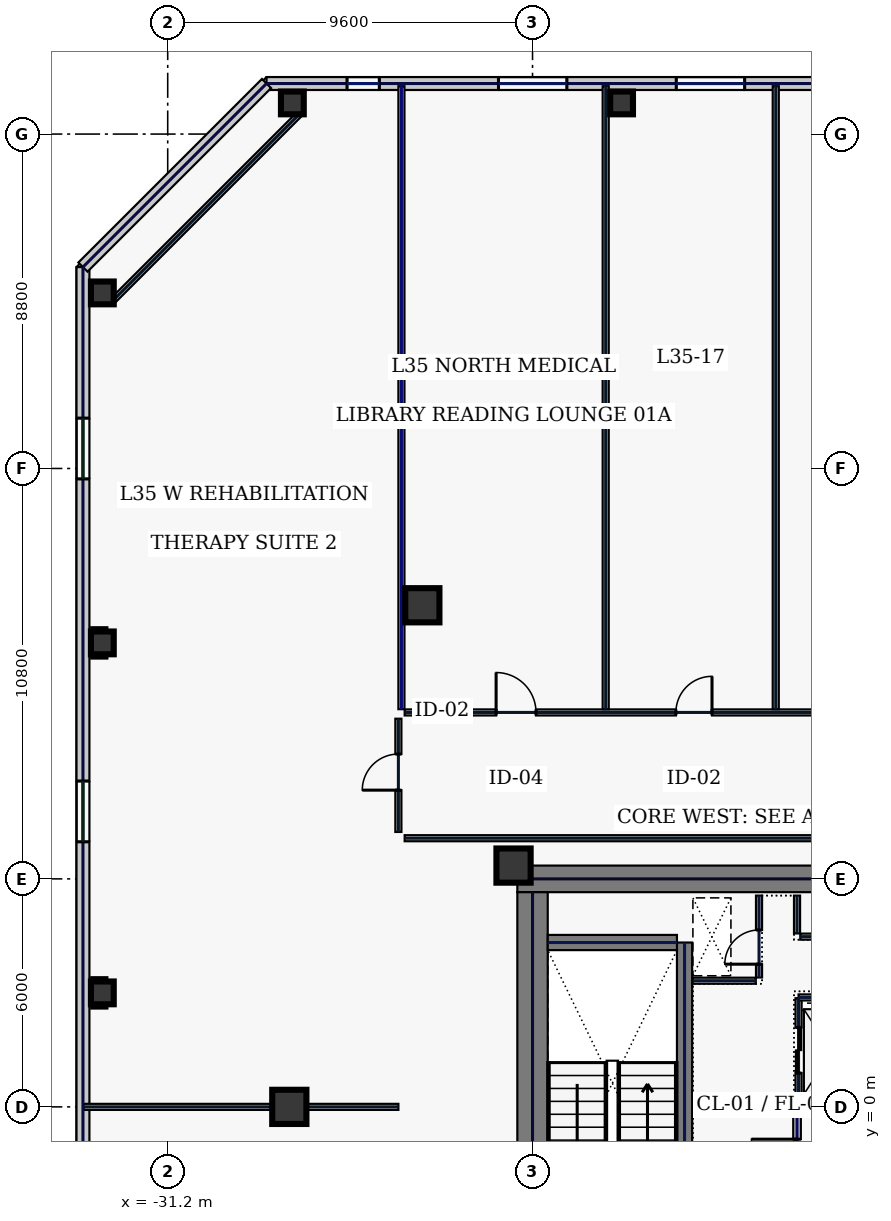
"""IFC4 building model, lengths in metres.
Left out: names, types, materials, properties, quantities, classifications, styles, units other than length and angle.
Written with IfcOpenShell. Run it as: python <this file> out.ifc"""

import sys

from ifc_helpers import new_model, si_unit, direction, frame, frame_2d, origin, origin_2d, place, context, subcontext, project, spatial, rectangle, hollow_rectangle, extrude, element, fill, save


model = new_model("IFC4")
c1 = context("Model", 3, precision=1e-05, world=origin(), true_north=direction((0.0, 1.0)))
c2 = subcontext(c1, "Body", "Model", "MODEL_VIEW")
j1 = project(units=[si_unit("LENGTHUNIT", "METRE"), si_unit("PLANEANGLEUNIT", "RADIAN")], contexts=[c1])
p1 = place(None, origin())
s1 = spatial("IfcSite", under=j1, at=p1, CompositionType="ELEMENT")
p2 = place(p1, origin())
s2 = spatial("IfcBuilding", under=s1, at=p2, CompositionType="ELEMENT")
p3 = place(p2, frame((0.0, 0.0, 156.2)))
s3 = spatial("IfcBuildingStorey", under=s2, at=p3, CompositionType="ELEMENT", Elevation=156.2)
p4 = place(p3, frame((-22.0, 6.0, 0.0), z_axis=(0.0, 0.0, 1.0), x_axis=(1.0, 0.0, 0.0)))
e1 = element("IfcWall", 1, at=p4, inside=s3, PredefinedType="SHEAR", context=c2, shape_type="SweptSolid", body=[
    extrude(rectangle(XDim=11.55, YDim=0.7, at=frame_2d((5.775, 0.0))), origin(), (0.0, 0.0, 1.0), 3.74),
])
p5 = place(p3, frame((-21.6, -5.65, 0.0), z_axis=(0.0, 0.0, 1.0), x_axis=(0.0, 1.0, 0.0)))
e2 = element("IfcWall", 2, at=p5, inside=s3, PredefinedType="SHEAR", context=c2, shape_type="SweptSolid", body=[
    extrude(rectangle(XDim=11.3, YDim=0.8, at=frame_2d((5.65, 0.0))), origin(), (0.0, 0.0, 1.0), 3.74),
])
p6 = place(p3, frame((-17.6, -4.325, 0.0), z_axis=(0.0, 0.0, 1.0), x_axis=(0.0, 1.0, 0.0)))
e3 = element("IfcWall", 3, at=p6, inside=s3, PredefinedType="SHEAR", context=c2, shape_type="SweptSolid", body=[
    extrude(rectangle(XDim=8.65, YDim=0.4, at=frame_2d((4.325, 0.0))), origin(), (0.0, 0.0, 1.0), 3.74),
])
p7 = place(p6, frame((0.25, 0.0, 0.0)))
e4 = element("IfcOpeningElement", 4, at=p7, cuts=e3, PredefinedType="OPENING", context=c2, shape_type="SweptSolid", body=[
    extrude(rectangle(XDim=1.1, YDim=2.2, at=frame_2d((0.55, 1.1))), frame((0.0, 0.21, 0.0), z_axis=(0.0, -1.0, 0.0), x_axis=(1.0, 0.0, 0.0)), (0.0, 0.0, 1.0), 0.42),
])
p8 = place(p3, frame((-21.2, 4.325, 0.0), z_axis=(0.0, 0.0, 1.0), x_axis=(1.0, 0.0, 0.0)))
e5 = element("IfcWall", 5, at=p8, inside=s3, PredefinedType="SHEAR", context=c2, shape_type="SweptSolid", body=[
    extrude(rectangle(XDim=3.4, YDim=0.4, at=frame_2d((1.7, 0.0))), origin(), (0.0, 0.0, 1.0), 3.74),
])
for number, where, z_axis, x_axis in (
    (6, (-22.1, 6.35, 0.0), (0.0, 0.0, 1.0), (1.0, 0.0, 0.0)),
    (7, (-24.5, 13.2, 0.0), (0.0, 0.0, 1.0), (1.0, 0.0, 0.0)),
    (8, (-28.0, 0.0, 0.0), (0.0, 0.0, 1.0), (1.0, 0.0, 0.0)),
):
    element("IfcColumn", number, at=place(p3, frame(where, z_axis=z_axis, x_axis=x_axis)), inside=s3, PredefinedType="COLUMN", context=c2, shape_type="SweptSolid", body=[
        extrude(hollow_rectangle(XDim=0.9, YDim=0.9, WallThickness=0.04, at=origin_2d()), origin(), (0.0, 0.0, 1.0), 3.74),
    ])
for number, where, z_axis, x_axis in (
    (9, (-19.257, 26.42, 0.0), (0.0, 0.0, 1.0), (1.0, 0.0, 0.0)),
    (10, (-27.92, 26.42, 0.0), (0.0, 0.0, 1.0), (1.0, 0.0, 0.0)),
    (11, (-32.92, 21.42, 0.0), (0.0, 0.0, 1.0), (1.0, 0.0, 0.0)),
    (12, (-32.92, 12.21, 0.0), (0.0, 0.0, 1.0), (1.0, 0.0, 0.0)),
    (13, (-32.92, 3.0, 0.0), (0.0, 0.0, 1.0), (1.0, 0.0, 0.0)),
):
    element("IfcColumn", number, at=place(p3, frame(where, z_axis=z_axis, x_axis=x_axis)), inside=s3, PredefinedType="COLUMN", context=c2, shape_type="SweptSolid", body=[
        extrude(hollow_rectangle(XDim=0.6, YDim=0.6, WallThickness=0.028, at=origin_2d()), origin(), (0.0, 0.0, 1.0), 3.74),
    ])
p9 = place(p3, frame((-8.663, 26.93, 0.0), z_axis=(0.0, 0.0, 1.0), x_axis=(-1.0, 0.0, 0.0)))
e14 = element("IfcWall", 14, at=p9, inside=s3, PredefinedType="STANDARD", context=c2, shape_type="SweptSolid", body=[
    extrude(rectangle(XDim=19.937, YDim=0.34, at=frame_2d((9.969, 0.0))), origin(), (0.0, 0.0, 1.0), 3.74),
])
p10 = place(p9, frame((16.968, 0.0, 0.7)))
e15 = element("IfcOpeningElement", 15, at=p10, cuts=e14, PredefinedType="OPENING", context=c2, shape_type="SweptSolid", body=[
    extrude(rectangle(XDim=0.85, YDim=1.85, at=frame_2d((0.425, 0.925))), frame((0.0, 0.18, 0.0), z_axis=(0.0, -1.0, 0.0), x_axis=(1.0, 0.0, 0.0)), (0.0, 0.0, 1.0), 0.36),
])
p11 = place(p9, frame((12.033, 0.0, 0.7)))
e16 = element("IfcOpeningElement", 16, at=p11, cuts=e14, PredefinedType="OPENING", context=c2, shape_type="SweptSolid", body=[
    extrude(rectangle(XDim=1.8, YDim=2.2, at=frame_2d((0.9, 1.1))), frame((0.0, 0.18, 0.0), z_axis=(0.0, -1.0, 0.0), x_axis=(1.0, 0.0, 0.0)), (0.0, 0.0, 1.0), 0.36),
])
p12 = place(p9, frame((7.355, 0.0, 0.7)))
e17 = element("IfcOpeningElement", 17, at=p12, cuts=e14, PredefinedType="OPENING", context=c2, shape_type="SweptSolid", body=[
    extrude(rectangle(XDim=1.8, YDim=2.2, at=frame_2d((0.9, 1.1))), frame((0.0, 0.18, 0.0), z_axis=(0.0, -1.0, 0.0), x_axis=(1.0, 0.0, 0.0)), (0.0, 0.0, 1.0), 0.36),
])
p13 = place(p9, frame((3.371, 0.0, 0.7)))
e18 = element("IfcOpeningElement", 18, at=p13, cuts=e14, PredefinedType="OPENING", context=c2, shape_type="SweptSolid", body=[
    extrude(rectangle(XDim=1.8, YDim=2.2, at=frame_2d((0.9, 1.1))), frame((0.0, 0.18, 0.0), z_axis=(0.0, -1.0, 0.0), x_axis=(1.0, 0.0, 0.0)), (0.0, 0.0, 1.0), 0.36),
])
p14 = place(p3, frame((-33.43, 22.1, 0.0), z_axis=(0.0, 0.0, 1.0), x_axis=(0.0, -1.0, 0.0)))
e19 = element("IfcWall", 19, at=p14, inside=s3, PredefinedType="STANDARD", context=c2, shape_type="SweptSolid", body=[
    extrude(rectangle(XDim=38.2, YDim=0.34, at=frame_2d((19.1, 0.0))), origin(), (0.0, 0.0, 1.0), 3.74),
])
p15 = place(p14, frame((3.975, 0.0, 0.58)))
e20 = element("IfcOpeningElement", 20, at=p15, cuts=e19, PredefinedType="OPENING", context=c2, shape_type="SweptSolid", body=[
    extrude(rectangle(XDim=1.6, YDim=2.3, at=frame_2d((0.8, 1.15))), frame((0.0, 0.18, 0.0), z_axis=(0.0, -1.0, 0.0), x_axis=(1.0, 0.0, 0.0)), (0.0, 0.0, 1.0), 0.36),
])
p16 = place(p14, frame((13.525, 0.0, 0.58)))
e21 = element("IfcOpeningElement", 21, at=p16, cuts=e19, PredefinedType="OPENING", context=c2, shape_type="SweptSolid", body=[
    extrude(rectangle(XDim=1.6, YDim=2.3, at=frame_2d((0.8, 1.15))), frame((0.0, 0.18, 0.0), z_axis=(0.0, -1.0, 0.0), x_axis=(1.0, 0.0, 0.0)), (0.0, 0.0, 1.0), 0.36),
])
p17 = place(p14, frame((23.075, 0.0, 0.58)))
e22 = element("IfcOpeningElement", 22, at=p17, cuts=e19, PredefinedType="OPENING", context=c2, shape_type="SweptSolid", body=[
    extrude(rectangle(XDim=1.6, YDim=2.3, at=frame_2d((0.8, 1.15))), frame((0.0, 0.18, 0.0), z_axis=(0.0, -1.0, 0.0), x_axis=(1.0, 0.0, 0.0)), (0.0, 0.0, 1.0), 0.36),
])
p18 = place(p14, frame((32.625, 0.0, 0.58)))
e23 = element("IfcOpeningElement", 23, at=p18, cuts=e19, PredefinedType="OPENING", context=c2, shape_type="SweptSolid", body=[
    extrude(rectangle(XDim=1.6, YDim=2.3, at=frame_2d((0.8, 1.15))), frame((0.0, 0.18, 0.0), z_axis=(0.0, -1.0, 0.0), x_axis=(1.0, 0.0, 0.0)), (0.0, 0.0, 1.0), 0.36),
])
p19 = place(p3, frame((-28.6, 26.93, 0.0), z_axis=(0.0, 0.0, 1.0), x_axis=(-0.707106781187, -0.707106781187, 0.0)))
e24 = element("IfcWall", 24, at=p19, inside=s3, PredefinedType="STANDARD", context=c2, shape_type="SweptSolid", body=[
    extrude(rectangle(XDim=6.83, YDim=0.34, at=frame_2d((3.415, 0.0))), origin(), (0.0, 0.0, 1.0), 3.74),
])
p20 = place(p3, frame((-14.6, 0.12, 0.0), z_axis=(0.0, 0.0, 1.0), x_axis=(0.0, 1.0, 0.0)))
e25 = element("IfcWall", 25, at=p20, inside=s3, PredefinedType="PARTITIONING", context=c2, shape_type="SweptSolid", body=[
    extrude(rectangle(XDim=2.74, YDim=0.16, at=frame_2d((1.37, 0.0))), origin(), (0.0, 0.0, 1.0), 3.74),
])
p21 = place(p20, frame((0.77, 0.0, 0.0)))
e26 = element("IfcOpeningElement", 26, at=p21, cuts=e25, PredefinedType="OPENING", context=c2, shape_type="SweptSolid", body=[
    extrude(rectangle(XDim=1.2, YDim=2.2, at=frame_2d((0.6, 1.1))), frame((0.0, 0.09, 0.0), z_axis=(0.0, -1.0, 0.0), x_axis=(1.0, 0.0, 0.0)), (0.0, 0.0, 1.0), 0.18),
])
for number, where, z_axis, x_axis in (
    (27, (-14.6, 0.1, 0.0), (0.0, 0.0, 1.0), (1.0, 0.0, 0.0)),
    (28, (-14.6, 2.88, 0.0), (0.0, 0.0, 1.0), (1.0, 0.0, 0.0)),
):
    element("IfcWall", number, at=place(p3, frame(where, z_axis=z_axis, x_axis=x_axis)), inside=s3, PredefinedType="PARTITIONING", context=c2, shape_type="SweptSolid", body=[
        extrude(rectangle(XDim=1.76, YDim=0.16, at=frame_2d((0.88, 0.0))), origin(), (0.0, 0.0, 1.0), 3.74),
    ])
p22 = place(p3, frame((-15.64, 3.405, 0.0), z_axis=(0.0, 0.0, 1.0), x_axis=(0.0, 1.0, 0.0)))
e29 = element("IfcWall", 29, at=p22, inside=s3, PredefinedType="PARTITIONING", context=c2, shape_type="SweptSolid", body=[
    extrude(rectangle(XDim=2.155, YDim=0.16, at=frame_2d((1.078, 0.0))), origin(), (0.0, 0.0, 1.0), 3.74),
])
p23 = place(p22, frame((0.35, 0.0, 0.0)))
e30 = element("IfcOpeningElement", 30, at=p23, cuts=e29, PredefinedType="OPENING", context=c2, shape_type="SweptSolid", body=[
    extrude(rectangle(XDim=0.9, YDim=2.2, at=frame_2d((0.45, 1.1))), frame((0.0, 0.09, 0.0), z_axis=(0.0, -1.0, 0.0), x_axis=(1.0, 0.0, 0.0)), (0.0, 0.0, 1.0), 0.18),
])
p24 = place(p3, frame((-17.38, 3.32, 0.0), z_axis=(0.0, 0.0, 1.0), x_axis=(1.0, 0.0, 0.0)))
e31 = element("IfcWall", 31, at=p24, inside=s3, PredefinedType="PARTITIONING", context=c2, shape_type="SweptSolid", body=[
    extrude(rectangle(XDim=1.655, YDim=0.16, at=frame_2d((0.827, 0.0))), origin(), (0.0, 0.0, 1.0), 3.74),
])
p25 = place(p3, frame((-14.555, 4.48, 0.0), z_axis=(0.0, 0.0, 1.0), x_axis=(1.0, 0.0, 0.0)))
e32 = element("IfcWall", 32, at=p25, inside=s3, PredefinedType="PARTITIONING", context=c2, shape_type="SweptSolid", body=[
    extrude(rectangle(XDim=1.89, YDim=0.16, at=frame_2d((0.945, 0.0))), origin(), (0.0, 0.0, 1.0), 3.74),
])
p26 = place(p25, frame((0.5, 0.0, 0.0)))
e33 = element("IfcOpeningElement", 33, at=p26, cuts=e32, PredefinedType="OPENING", context=c2, shape_type="SweptSolid", body=[
    extrude(rectangle(XDim=0.95, YDim=2.2, at=frame_2d((0.475, 1.1))), frame((0.0, 0.09, 0.0), z_axis=(0.0, -1.0, 0.0), x_axis=(1.0, 0.0, 0.0)), (0.0, 0.0, 1.0), 0.18),
])
p27 = place(p3, frame((-14.64, 4.565, 0.0), z_axis=(0.0, 0.0, 1.0), x_axis=(0.0, 1.0, 0.0)))
e34 = element("IfcWall", 34, at=p27, inside=s3, PredefinedType="PARTITIONING", context=c2, shape_type="SweptSolid", body=[
    extrude(rectangle(XDim=0.995, YDim=0.16, at=frame_2d((0.498, 0.0))), origin(), (0.0, 0.0, 1.0), 3.74),
])
p28 = place(p3, frame((-14.64, -5.56, 0.0), z_axis=(0.0, 0.0, 1.0), x_axis=(0.0, 1.0, 0.0)))
e35 = element("IfcWall", 35, at=p28, inside=s3, PredefinedType="SOLIDWALL", context=c2, shape_type="SweptSolid", body=[
    extrude(rectangle(XDim=5.6, YDim=0.2, at=frame_2d((2.8, 0.0))), origin(), (0.0, 0.0, 1.0), 3.74),
])
p29 = place(p28, frame((3.51, 0.0, 0.0)))
e36 = element("IfcOpeningElement", 36, at=p29, cuts=e35, PredefinedType="OPENING", context=c2, shape_type="SweptSolid", body=[
    extrude(rectangle(XDim=1.2, YDim=2.2, at=frame_2d((0.6, 1.1))), frame((0.0, 0.11, 0.0), z_axis=(0.0, -1.0, 0.0), x_axis=(1.0, 0.0, 0.0)), (0.0, 0.0, 1.0), 0.22),
])
p30 = place(p3, frame((-27.68, 26.18, 0.0), z_axis=(0.0, 0.0, 1.0), x_axis=(-0.707106781187, -0.707106781187, 0.0)))
e37 = element("IfcWall", 37, at=p30, inside=s3, PredefinedType="PARTITIONING", context=c2, shape_type="SweptSolid", body=[
    extrude(rectangle(XDim=7.071, YDim=0.16, at=frame_2d((3.536, 0.0))), origin(), (0.0, 0.0, 1.0), 3.74),
])
p31 = place(p3, frame((-10.715, 7.07, 0.0), z_axis=(0.0, 0.0, 1.0), x_axis=(-1.0, 0.0, 0.0)))
e38 = element("IfcWall", 38, at=p31, inside=s3, PredefinedType="PARTITIONING", context=c2, shape_type="SweptSolid", body=[
    extrude(rectangle(XDim=14.25, YDim=0.16, at=frame_2d((7.125, 0.0))), origin(), (0.0, 0.0, 1.0), 3.74),
])
p32 = place(p3, frame((-25.13, 7.235, 0.0), z_axis=(0.0, 0.0, 1.0), x_axis=(0.0, 1.0, 0.0)))
e39 = element("IfcWall", 39, at=p32, inside=s3, PredefinedType="PARTITIONING", context=c2, shape_type="SweptSolid", body=[
    extrude(rectangle(XDim=2.98, YDim=0.16, at=frame_2d((1.49, 0.0))), origin(), (0.0, 0.0, 1.0), 3.74),
])
p33 = place(p32, frame((1.1, 0.0, 0.0)))
e40 = element("IfcOpeningElement", 40, at=p33, cuts=e39, PredefinedType="OPENING", context=c2, shape_type="SweptSolid", body=[
    extrude(rectangle(XDim=0.95, YDim=2.2, at=frame_2d((0.475, 1.1))), frame((0.0, 0.09, 0.0), z_axis=(0.0, -1.0, 0.0), x_axis=(1.0, 0.0, 0.0)), (0.0, 0.0, 1.0), 0.18),
])
p34 = place(p3, frame((-24.965, 10.38, 0.0), z_axis=(0.0, 0.0, 1.0), x_axis=(1.0, 0.0, 0.0)))
e41 = element("IfcWall", 41, at=p34, inside=s3, PredefinedType="PARTITIONING", context=c2, shape_type="SweptSolid", body=[
    extrude(rectangle(XDim=49.93, YDim=0.16, at=frame_2d((24.965, 0.0))), origin(), (0.0, 0.0, 1.0), 3.74),
])
p35 = place(p34, frame((2.406, 0.0, 0.0)))
e42 = element("IfcOpeningElement", 42, at=p35, cuts=e41, PredefinedType="OPENING", context=c2, shape_type="SweptSolid", body=[
    extrude(rectangle(XDim=1.05, YDim=2.2, at=frame_2d((0.525, 1.1))), frame((0.0, 0.09, 0.0), z_axis=(0.0, -1.0, 0.0), x_axis=(1.0, 0.0, 0.0)), (0.0, 0.0, 1.0), 0.18),
])
p36 = place(p34, frame((7.137, 0.0, 0.0)))
e43 = element("IfcOpeningElement", 43, at=p36, cuts=e41, PredefinedType="OPENING", context=c2, shape_type="SweptSolid", body=[
    extrude(rectangle(XDim=0.95, YDim=2.2, at=frame_2d((0.475, 1.1))), frame((0.0, 0.09, 0.0), z_axis=(0.0, -1.0, 0.0), x_axis=(1.0, 0.0, 0.0)), (0.0, 0.0, 1.0), 0.18),
])
p37 = place(p34, frame((17.18, 0.0, 0.0)))
e44 = element("IfcOpeningElement", 44, at=p37, cuts=e41, PredefinedType="OPENING", context=c2, shape_type="SweptSolid", body=[
    extrude(rectangle(XDim=0.95, YDim=2.2, at=frame_2d((0.475, 1.1))), frame((0.0, 0.09, 0.0), z_axis=(0.0, -1.0, 0.0), x_axis=(1.0, 0.0, 0.0)), (0.0, 0.0, 1.0), 0.18),
])
p38 = place(p34, frame((32.34, 0.0, 0.0)))
e45 = element("IfcOpeningElement", 45, at=p38, cuts=e41, PredefinedType="OPENING", context=c2, shape_type="SweptSolid", body=[
    extrude(rectangle(XDim=0.95, YDim=2.2, at=frame_2d((0.475, 1.1))), frame((0.0, 0.09, 0.0), z_axis=(0.0, -1.0, 0.0), x_axis=(1.0, 0.0, 0.0)), (0.0, 0.0, 1.0), 0.18),
])
p39 = place(p34, frame((42.403, 0.0, 0.0)))
e46 = element("IfcOpeningElement", 46, at=p39, cuts=e41, PredefinedType="OPENING", context=c2, shape_type="SweptSolid", body=[
    extrude(rectangle(XDim=0.95, YDim=2.2, at=frame_2d((0.475, 1.1))), frame((0.0, 0.09, 0.0), z_axis=(0.0, -1.0, 0.0), x_axis=(1.0, 0.0, 0.0)), (0.0, 0.0, 1.0), 0.18),
])
p40 = place(p34, frame((47.173, 0.0, 0.0)))
e47 = element("IfcOpeningElement", 47, at=p40, cuts=e41, PredefinedType="OPENING", context=c2, shape_type="SweptSolid", body=[
    extrude(rectangle(XDim=1.05, YDim=2.2, at=frame_2d((0.525, 1.1))), frame((0.0, 0.09, 0.0), z_axis=(0.0, -1.0, 0.0), x_axis=(1.0, 0.0, 0.0)), (0.0, 0.0, 1.0), 0.18),
])
p41 = place(p3, frame((-25.05, 10.465, 0.0), z_axis=(0.0, 0.0, 1.0), x_axis=(0.0, 1.0, 0.0)))
e48 = element("IfcWall", 48, at=p41, inside=s3, PredefinedType="PARTITIONING", context=c2, shape_type="SweptSolid", body=[
    extrude(rectangle(XDim=16.395, YDim=0.16, at=frame_2d((8.198, 0.0))), origin(), (0.0, 0.0, 1.0), 3.285),
])
for number, where, z_axis, x_axis in (
    (49, (-15.2, 10.465, 0.0), (0.0, 0.0, 1.0), (0.0, 1.0, 0.0)),
    (50, (-19.675, 10.465, 0.0), (0.0, 0.0, 1.0), (0.0, 1.0, 0.0)),
):
    element("IfcWall", number, at=place(p3, frame(where, z_axis=z_axis, x_axis=x_axis)), inside=s3, PredefinedType="PARTITIONING", context=c2, shape_type="SweptSolid", body=[
        extrude(rectangle(XDim=16.395, YDim=0.16, at=frame_2d((8.198, 0.0))), origin(), (0.0, 0.0, 1.0), 3.74),
    ])
p42 = place(p3, frame((-33.41, 0.0, 0.0), z_axis=(0.0, 0.0, 1.0), x_axis=(1.0, 0.0, 0.0)))
e51 = element("IfcWall", 51, at=p42, inside=s3, PredefinedType="PARTITIONING", context=c2, shape_type="SweptSolid", body=[
    extrude(rectangle(XDim=8.28, YDim=0.16, at=frame_2d((4.14, 0.0))), origin(), (0.0, 0.0, 1.0), 3.74),
])
p43 = place(p10, origin())
e52 = element("IfcWindow", 52, at=p43, inside=s3, PartitioningType="SINGLE_PANEL", PredefinedType="WINDOW", context=c2, shape_type="SweptSolid", body=[
    extrude(rectangle(XDim=0.85, YDim=1.85, at=frame_2d((0.425, 0.925))), frame((0.0, 0.03, 0.0), z_axis=(0.0, -1.0, 0.0), x_axis=(1.0, 0.0, 0.0)), (0.0, 0.0, 1.0), 0.06),
])
fill(e15, e52)
p44 = place(p11, origin())
e53 = element("IfcWindow", 53, at=p44, inside=s3, PartitioningType="SINGLE_PANEL", PredefinedType="WINDOW", context=c2, shape_type="SweptSolid", body=[
    extrude(rectangle(XDim=1.8, YDim=2.2, at=frame_2d((0.9, 1.1))), frame((0.0, 0.03, 0.0), z_axis=(0.0, -1.0, 0.0), x_axis=(1.0, 0.0, 0.0)), (0.0, 0.0, 1.0), 0.06),
])
fill(e16, e53)
p45 = place(p12, origin())
e54 = element("IfcWindow", 54, at=p45, inside=s3, PartitioningType="SINGLE_PANEL", PredefinedType="WINDOW", context=c2, shape_type="SweptSolid", body=[
    extrude(rectangle(XDim=1.8, YDim=2.2, at=frame_2d((0.9, 1.1))), frame((0.0, 0.03, 0.0), z_axis=(0.0, -1.0, 0.0), x_axis=(1.0, 0.0, 0.0)), (0.0, 0.0, 1.0), 0.06),
])
fill(e17, e54)
p46 = place(p15, origin())
e55 = element("IfcWindow", 55, at=p46, inside=s3, PartitioningType="SINGLE_PANEL", PredefinedType="WINDOW", context=c2, shape_type="SweptSolid", body=[
    extrude(rectangle(XDim=1.6, YDim=2.3, at=frame_2d((0.8, 1.15))), frame((0.0, 0.03, 0.0), z_axis=(0.0, -1.0, 0.0), x_axis=(1.0, 0.0, 0.0)), (0.0, 0.0, 1.0), 0.06),
])
fill(e20, e55)
p47 = place(p16, origin())
e56 = element("IfcWindow", 56, at=p47, inside=s3, PartitioningType="SINGLE_PANEL", PredefinedType="WINDOW", context=c2, shape_type="SweptSolid", body=[
    extrude(rectangle(XDim=1.6, YDim=2.3, at=frame_2d((0.8, 1.15))), frame((0.0, 0.03, 0.0), z_axis=(0.0, -1.0, 0.0), x_axis=(1.0, 0.0, 0.0)), (0.0, 0.0, 1.0), 0.06),
])
fill(e21, e56)
p48 = place(p21, origin())
e57 = element("IfcDoor", 57, at=p48, inside=s3, OperationType="SLIDING_TO_LEFT", PredefinedType="DOOR", context=c2, shape_type="SweptSolid", body=[
    extrude(rectangle(XDim=1.2, YDim=2.2, at=frame_2d((0.6, 1.1))), frame((0.0, 0.025, 0.0), z_axis=(0.0, -1.0, 0.0), x_axis=(1.0, 0.0, 0.0)), (0.0, 0.0, 1.0), 0.05),
])
fill(e26, e57)
p49 = place(p23, origin())
e58 = element("IfcDoor", 58, at=p49, inside=s3, OperationType="SINGLE_SWING_LEFT", PredefinedType="DOOR", context=c2, shape_type="SweptSolid", body=[
    extrude(rectangle(XDim=0.9, YDim=2.2, at=frame_2d((0.45, 1.1))), frame((0.0, 0.025, 0.0), z_axis=(0.0, -1.0, 0.0), x_axis=(1.0, 0.0, 0.0)), (0.0, 0.0, 1.0), 0.05),
])
fill(e30, e58)
p50 = place(p29, origin())
e59 = element("IfcDoor", 59, at=p50, inside=s3, OperationType="SINGLE_SWING_RIGHT", PredefinedType="DOOR", context=c2, shape_type="SweptSolid", body=[
    extrude(rectangle(XDim=1.2, YDim=2.2, at=frame_2d((0.6, 1.1))), frame((0.0, 0.025, 0.0), z_axis=(0.0, -1.0, 0.0), x_axis=(1.0, 0.0, 0.0)), (0.0, 0.0, 1.0), 0.05),
])
fill(e36, e59)
p51 = place(p35, origin())
e60 = element("IfcDoor", 60, at=p51, inside=s3, OperationType="SINGLE_SWING_LEFT", PredefinedType="DOOR", context=c2, shape_type="SweptSolid", body=[
    extrude(rectangle(XDim=1.05, YDim=2.2, at=frame_2d((0.525, 1.1))), frame((0.0, 0.025, 0.0), z_axis=(0.0, -1.0, 0.0), x_axis=(1.0, 0.0, 0.0)), (0.0, 0.0, 1.0), 0.05),
])
fill(e42, e60)
p52 = place(p36, origin())
e61 = element("IfcDoor", 61, at=p52, inside=s3, OperationType="SINGLE_SWING_RIGHT", PredefinedType="DOOR", context=c2, shape_type="SweptSolid", body=[
    extrude(rectangle(XDim=0.95, YDim=2.2, at=frame_2d((0.475, 1.1))), frame((0.0, 0.025, 0.0), z_axis=(0.0, -1.0, 0.0), x_axis=(1.0, 0.0, 0.0)), (0.0, 0.0, 1.0), 0.05),
])
fill(e43, e61)
p53 = place(p33, origin())
e62 = element("IfcDoor", 62, at=p53, inside=s3, OperationType="SINGLE_SWING_LEFT", PredefinedType="DOOR", context=c2, shape_type="SweptSolid", body=[
    extrude(rectangle(XDim=0.95, YDim=2.2, at=frame_2d((0.475, 1.1))), frame((0.0, 0.025, 0.0), z_axis=(0.0, -1.0, 0.0), x_axis=(1.0, 0.0, 0.0)), (0.0, 0.0, 1.0), 0.05),
])
fill(e40, e62)
save(model, sys.argv[1])
